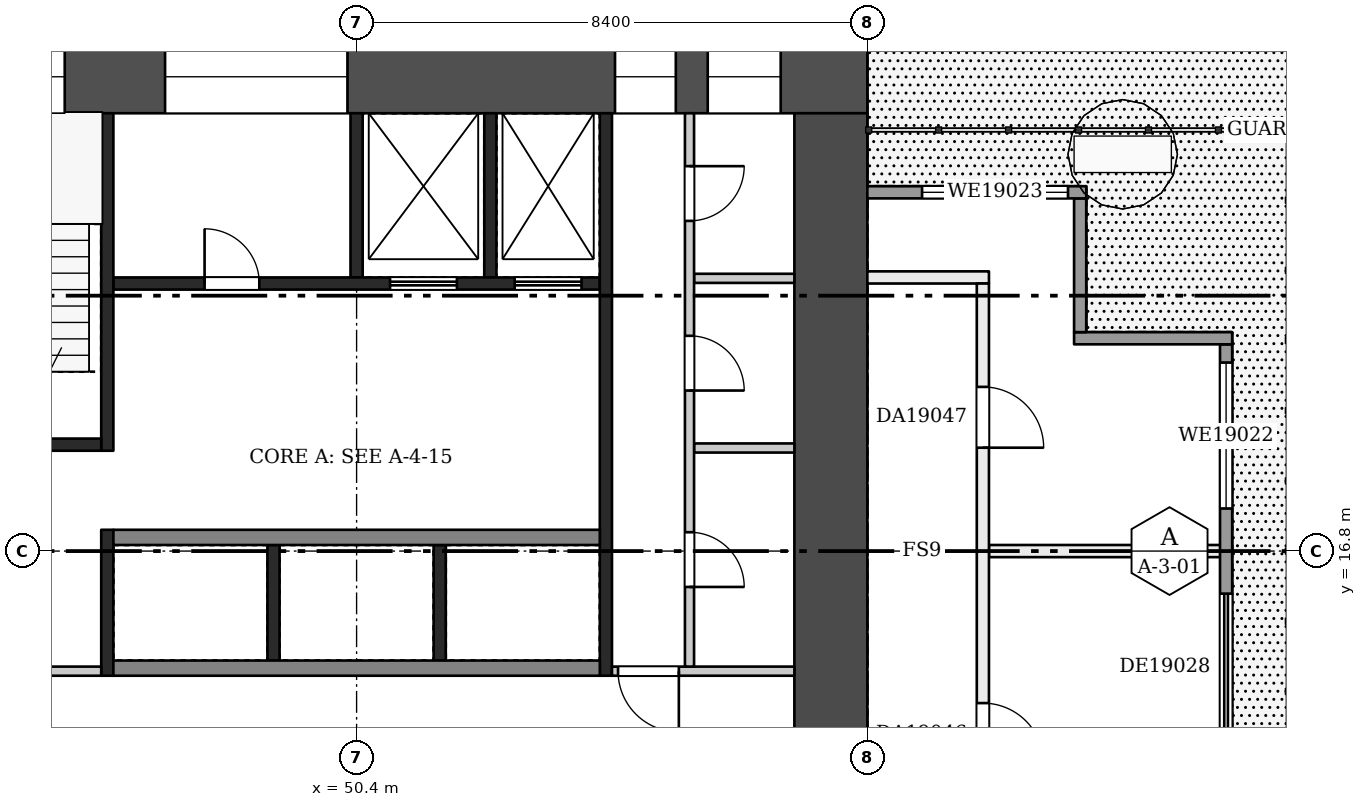
"""IFC4 building model, lengths in metres.
Left out: names, types, materials, properties, quantities, classifications, styles, units other than length and angle.
Written with IfcOpenShell. Run it as: python <this file> out.ifc"""

import sys

from ifc_helpers import new_model, si_unit, direction, frame, frame_2d, origin, place, context, subcontext, project, spatial, rectangle, extrude, element, fill, save


model = new_model("IFC4")
c1 = context("Model", 3, precision=1e-05, world=origin(), true_north=direction((0.0, 1.0)))
c2 = subcontext(c1, "Body", "Model", "MODEL_VIEW")
j1 = project(units=[si_unit("LENGTHUNIT", "METRE"), si_unit("PLANEANGLEUNIT", "RADIAN")], contexts=[c1])
p1 = place(None, origin())
s1 = spatial("IfcSite", under=j1, at=p1, CompositionType="ELEMENT")
p2 = place(p1, origin())
s2 = spatial("IfcBuilding", under=s1, at=p2, CompositionType="ELEMENT")
p3 = place(p2, frame((0.0, 0.0, 81.2)))
s3 = spatial("IfcBuildingStorey", under=s2, at=p3, CompositionType="ELEMENT", Elevation=81.2)
p4 = place(p3, frame((42.0, 24.6, 0.0), z_axis=(0.0, 0.0, 1.0), x_axis=(1.0, 0.0, 0.0)))
e1 = element("IfcWall", 1, at=p4, inside=s3, PredefinedType="SHEAR", context=c2, shape_type="SweptSolid", body=[
    extrude(rectangle(XDim=16.8, YDim=1.2, at=frame_2d((8.4, 0.0))), origin(), (0.0, 0.0, 1.0), 3.22),
])
p5 = place(p4, frame((1.8, 0.0, 0.5)))
e2 = element("IfcOpeningElement", 2, at=p5, cuts=e1, PredefinedType="OPENING", context=c2, shape_type="SweptSolid", body=[
    extrude(rectangle(XDim=1.8, YDim=2.4, at=frame_2d((0.9, 1.2))), frame((0.0, 0.61, 0.0), z_axis=(0.0, -1.0, 0.0), x_axis=(1.0, 0.0, 0.0)), (0.0, 0.0, 1.0), 1.22),
])
p6 = place(p4, frame((5.25, 0.0, 1.6)))
e3 = element("IfcOpeningElement", 3, at=p6, cuts=e1, PredefinedType="OPENING", context=c2, shape_type="SweptSolid", body=[
    extrude(rectangle(XDim=3.0, YDim=1.2, at=frame_2d((1.5, 0.6))), frame((0.0, 0.61, 0.0), z_axis=(0.0, -1.0, 0.0), x_axis=(1.0, 0.0, 0.0)), (0.0, 0.0, 1.0), 1.22),
])
p7 = place(p4, frame((12.65, 0.0, 0.6)))
e4 = element("IfcOpeningElement", 4, at=p7, cuts=e1, PredefinedType="OPENING", context=c2, shape_type="SweptSolid", body=[
    extrude(rectangle(XDim=1.0, YDim=2.1, at=frame_2d((0.5, 1.05))), frame((0.0, 0.61, 0.0), z_axis=(0.0, -1.0, 0.0), x_axis=(1.0, 0.0, 0.0)), (0.0, 0.0, 1.0), 1.22),
])
p8 = place(p4, frame((14.175, 0.0, 1.6)))
e5 = element("IfcOpeningElement", 5, at=p8, cuts=e1, PredefinedType="OPENING", context=c2, shape_type="SweptSolid", body=[
    extrude(rectangle(XDim=1.2, YDim=1.2, at=frame_2d((0.6, 0.6))), frame((0.0, 0.61, 0.0), z_axis=(0.0, -1.0, 0.0), x_axis=(1.0, 0.0, 0.0)), (0.0, 0.0, 1.0), 1.22),
])
p9 = place(p3, frame((58.2, 9.6, 0.0), z_axis=(0.0, 0.0, 1.0), x_axis=(0.0, 1.0, 0.0)))
e6 = element("IfcWall", 6, at=p9, inside=s3, PredefinedType="SHEAR", context=c2, shape_type="SweptSolid", body=[
    extrude(rectangle(XDim=14.4, YDim=1.2, at=frame_2d((7.2, 0.0))), origin(), (0.0, 0.0, 1.0), 3.22),
])
p10 = place(p9, frame((2.1, 0.0, 0.0)))
e7 = element("IfcOpeningElement", 7, at=p10, cuts=e6, PredefinedType="OPENING", context=c2, shape_type="SweptSolid", body=[
    extrude(rectangle(XDim=1.8, YDim=2.1, at=frame_2d((0.9, 1.05))), frame((0.0, 0.61, 0.0), z_axis=(0.0, -1.0, 0.0), x_axis=(1.0, 0.0, 0.0)), (0.0, 0.0, 1.0), 1.22),
])
for number, where, z_axis, x_axis in (
    (8, (49.033, 15.0, 0.0), (0.0, 0.0, 1.0), (0.0, 1.0, 0.0)),
    (9, (51.767, 15.0, 0.0), (0.0, 0.0, 1.0), (0.0, 1.0, 0.0)),
):
    element("IfcWall", number, at=place(p3, frame(where, z_axis=z_axis, x_axis=x_axis)), inside=s3, PredefinedType="SHEAR", context=c2, shape_type="SweptSolid", body=[
        extrude(rectangle(XDim=1.9, YDim=0.2, at=frame_2d((0.95, 0.0))), origin(), (0.0, 0.0, 1.0), 3.22),
    ])
for number, where, z_axis, x_axis in (
    (10, (46.4, 14.875, 0.0), (0.0, 0.0, 1.0), (1.0, 0.0, 0.0)),
    (11, (46.4, 17.025, 0.0), (0.0, 0.0, 1.0), (1.0, 0.0, 0.0)),
):
    element("IfcWall", number, at=place(p3, frame(where, z_axis=z_axis, x_axis=x_axis)), inside=s3, PredefinedType="SHEAR", context=c2, shape_type="SweptSolid", body=[
        extrude(rectangle(XDim=8.0, YDim=0.25, at=frame_2d((4.0, 0.0))), origin(), (0.0, 0.0, 1.0), 3.22),
    ])
for number, where, z_axis, x_axis in (
    (12, (50.4, 21.3, 0.0), (0.0, 0.0, 1.0), (0.0, 1.0, 0.0)),
    (13, (52.6, 21.3, 0.0), (0.0, 0.0, 1.0), (0.0, 1.0, 0.0)),
):
    element("IfcWall", number, at=place(p3, frame(where, z_axis=z_axis, x_axis=x_axis)), inside=s3, PredefinedType="SHEAR", context=c2, shape_type="SweptSolid", body=[
        extrude(rectangle(XDim=2.7, YDim=0.2, at=frame_2d((1.35, 0.0))), origin(), (0.0, 0.0, 1.0), 3.22),
    ])
p11 = place(p3, frame((46.4, 21.2, 0.0), z_axis=(0.0, 0.0, 1.0), x_axis=(1.0, 0.0, 0.0)))
e14 = element("IfcWall", 14, at=p11, inside=s3, PredefinedType="SHEAR", context=c2, shape_type="SweptSolid", body=[
    extrude(rectangle(XDim=8.0, YDim=0.2, at=frame_2d((4.0, 0.0))), origin(), (0.0, 0.0, 1.0), 3.22),
])
p12 = place(p11, frame((1.5, 0.0, 0.0)))
e15 = element("IfcOpeningElement", 15, at=p12, cuts=e14, PredefinedType="OPENING", context=c2, shape_type="SweptSolid", body=[
    extrude(rectangle(XDim=0.9, YDim=2.1, at=frame_2d((0.45, 1.05))), frame((0.0, 0.11, 0.0), z_axis=(0.0, -1.0, 0.0), x_axis=(1.0, 0.0, 0.0)), (0.0, 0.0, 1.0), 0.22),
])
p13 = place(p11, frame((4.55, 0.0, 0.0)))
e16 = element("IfcOpeningElement", 16, at=p13, cuts=e14, PredefinedType="OPENING", context=c2, shape_type="SweptSolid", body=[
    extrude(rectangle(XDim=1.1, YDim=2.1, at=frame_2d((0.55, 1.05))), frame((0.0, 0.11, 0.0), z_axis=(0.0, -1.0, 0.0), x_axis=(1.0, 0.0, 0.0)), (0.0, 0.0, 1.0), 0.22),
])
p14 = place(p11, frame((6.6, 0.0, 0.0)))
e17 = element("IfcOpeningElement", 17, at=p14, cuts=e14, PredefinedType="OPENING", context=c2, shape_type="SweptSolid", body=[
    extrude(rectangle(XDim=1.1, YDim=2.1, at=frame_2d((0.55, 1.05))), frame((0.0, 0.11, 0.0), z_axis=(0.0, -1.0, 0.0), x_axis=(1.0, 0.0, 0.0)), (0.0, 0.0, 1.0), 0.22),
])
p15 = place(p3, frame((46.3, 14.75, 0.0), z_axis=(0.0, 0.0, 1.0), x_axis=(0.0, 1.0, 0.0)))
e18 = element("IfcWall", 18, at=p15, inside=s3, PredefinedType="SHEAR", context=c2, shape_type="SweptSolid", body=[
    extrude(rectangle(XDim=2.4, YDim=0.2, at=frame_2d((1.2, 0.0))), origin(), (0.0, 0.0, 1.0), 3.22),
])
p16 = place(p3, frame((46.3, 18.45, 0.0), z_axis=(0.0, 0.0, 1.0), x_axis=(0.0, 1.0, 0.0)))
e19 = element("IfcWall", 19, at=p16, inside=s3, PredefinedType="SHEAR", context=c2, shape_type="SweptSolid", body=[
    extrude(rectangle(XDim=5.55, YDim=0.2, at=frame_2d((2.775, 0.0))), origin(), (0.0, 0.0, 1.0), 3.22),
])
p17 = place(p3, frame((43.2, 14.825, 0.0), z_axis=(0.0, 0.0, 1.0), x_axis=(1.0, 0.0, 0.0)))
e20 = element("IfcWall", 20, at=p17, inside=s3, PredefinedType="PARTITIONING", context=c2, shape_type="SweptSolid", body=[
    extrude(rectangle(XDim=3.0, YDim=0.15, at=frame_2d((1.5, 0.0))), origin(), (0.0, 0.0, 1.0), 3.22),
])
p18 = place(p17, frame((1.0, 0.0, 0.0)))
e21 = element("IfcOpeningElement", 21, at=p18, cuts=e20, PredefinedType="OPENING", context=c2, shape_type="SweptSolid", body=[
    extrude(rectangle(XDim=1.0, YDim=2.1, at=frame_2d((0.5, 1.05))), frame((0.0, 0.085, 0.0), z_axis=(0.0, -1.0, 0.0), x_axis=(1.0, 0.0, 0.0)), (0.0, 0.0, 1.0), 0.17),
])
p19 = place(p3, frame((43.2, 18.55, 0.0), z_axis=(0.0, 0.0, 1.0), x_axis=(1.0, 0.0, 0.0)))
e22 = element("IfcWall", 22, at=p19, inside=s3, PredefinedType="SHEAR", context=c2, shape_type="SweptSolid", body=[
    extrude(rectangle(XDim=3.0, YDim=0.2, at=frame_2d((1.5, 0.0))), origin(), (0.0, 0.0, 1.0), 3.22),
])
p20 = place(p19, frame((1.0, 0.0, 0.0)))
e23 = element("IfcOpeningElement", 23, at=p20, cuts=e22, PredefinedType="OPENING", context=c2, shape_type="SweptSolid", body=[
    extrude(rectangle(XDim=1.0, YDim=2.1, at=frame_2d((0.5, 1.05))), frame((0.0, 0.11, 0.0), z_axis=(0.0, -1.0, 0.0), x_axis=(1.0, 0.0, 0.0)), (0.0, 0.0, 1.0), 0.22),
])
p21 = place(p3, frame((54.5, 14.75, 0.0), z_axis=(0.0, 0.0, 1.0), x_axis=(0.0, 1.0, 0.0)))
e24 = element("IfcWall", 24, at=p21, inside=s3, PredefinedType="SHEAR", context=c2, shape_type="SweptSolid", body=[
    extrude(rectangle(XDim=9.25, YDim=0.2, at=frame_2d((4.625, 0.0))), origin(), (0.0, 0.0, 1.0), 3.22),
])
p22 = place(p3, frame((54.6, 14.825, 0.0), z_axis=(0.0, 0.0, 1.0), x_axis=(1.0, 0.0, 0.0)))
e25 = element("IfcWall", 25, at=p22, inside=s3, PredefinedType="PARTITIONING", context=c2, shape_type="SweptSolid", body=[
    extrude(rectangle(XDim=3.0, YDim=0.15, at=frame_2d((1.5, 0.0))), origin(), (0.0, 0.0, 1.0), 3.22),
])
p23 = place(p22, frame((0.1, 0.0, 0.0)))
e26 = element("IfcOpeningElement", 26, at=p23, cuts=e25, PredefinedType="OPENING", context=c2, shape_type="SweptSolid", body=[
    extrude(rectangle(XDim=1.0, YDim=2.1, at=frame_2d((0.5, 1.05))), frame((0.0, 0.085, 0.0), z_axis=(0.0, -1.0, 0.0), x_axis=(1.0, 0.0, 0.0)), (0.0, 0.0, 1.0), 0.17),
])
for number, where, z_axis, x_axis in (
    (27, (55.95, 18.495, 0.0), (0.0, 0.0, 1.0), (1.0, 0.0, 0.0)),
    (28, (55.95, 21.285, 0.0), (0.0, 0.0, 1.0), (1.0, 0.0, 0.0)),
):
    element("IfcWall", number, at=place(p3, frame(where, z_axis=z_axis, x_axis=x_axis)), inside=s3, PredefinedType="PARTITIONING", context=c2, shape_type="SweptSolid", body=[
        extrude(rectangle(XDim=1.65, YDim=0.15, at=frame_2d((0.825, 0.0))), origin(), (0.0, 0.0, 1.0), 3.22),
    ])
p24 = place(p3, frame((55.875, 14.9, 0.0), z_axis=(0.0, 0.0, 1.0), x_axis=(0.0, 1.0, 0.0)))
e29 = element("IfcWall", 29, at=p24, inside=s3, PredefinedType="PARTITIONING", context=c2, shape_type="SweptSolid", body=[
    extrude(rectangle(XDim=9.1, YDim=0.15, at=frame_2d((4.55, 0.0))), origin(), (0.0, 0.0, 1.0), 3.22),
])
p25 = place(p24, frame((1.31, 0.0, 0.0)))
e30 = element("IfcOpeningElement", 30, at=p25, cuts=e29, PredefinedType="OPENING", context=c2, shape_type="SweptSolid", body=[
    extrude(rectangle(XDim=0.9, YDim=2.1, at=frame_2d((0.45, 1.05))), frame((0.0, 0.085, 0.0), z_axis=(0.0, -1.0, 0.0), x_axis=(1.0, 0.0, 0.0)), (0.0, 0.0, 1.0), 0.17),
])
p26 = place(p24, frame((4.54, 0.0, 0.0)))
e31 = element("IfcOpeningElement", 31, at=p26, cuts=e29, PredefinedType="OPENING", context=c2, shape_type="SweptSolid", body=[
    extrude(rectangle(XDim=0.9, YDim=2.1, at=frame_2d((0.45, 1.05))), frame((0.0, 0.085, 0.0), z_axis=(0.0, -1.0, 0.0), x_axis=(1.0, 0.0, 0.0)), (0.0, 0.0, 1.0), 0.17),
])
p27 = place(p24, frame((7.33, 0.0, 0.0)))
e32 = element("IfcOpeningElement", 32, at=p27, cuts=e29, PredefinedType="OPENING", context=c2, shape_type="SweptSolid", body=[
    extrude(rectangle(XDim=0.9, YDim=2.1, at=frame_2d((0.45, 1.05))), frame((0.0, 0.085, 0.0), z_axis=(0.0, -1.0, 0.0), x_axis=(1.0, 0.0, 0.0)), (0.0, 0.0, 1.0), 0.17),
])
p28 = place(p3, frame((60.8, 16.8, 0.0), z_axis=(0.0, 0.0, 1.0), x_axis=(1.0, 0.0, 0.0)))
e33 = element("IfcWall", 33, at=p28, inside=s3, PredefinedType="PARTITIONING", context=c2, shape_type="SweptSolid", body=[
    extrude(rectangle(XDim=3.9, YDim=0.2, at=frame_2d((1.95, 0.0))), origin(), (0.0, 0.0, 1.0), 3.22),
])
p29 = place(p3, frame((58.8, 21.3, 0.0), z_axis=(0.0, 0.0, 1.0), x_axis=(1.0, 0.0, 0.0)))
e34 = element("IfcWall", 34, at=p29, inside=s3, PredefinedType="PARTITIONING", context=c2, shape_type="SweptSolid", body=[
    extrude(rectangle(XDim=2.0, YDim=0.2, at=frame_2d((1.0, 0.0))), origin(), (0.0, 0.0, 1.0), 3.22),
])
p30 = place(p3, frame((60.7, 10.9, 0.0), z_axis=(0.0, 0.0, 1.0), x_axis=(0.0, 1.0, 0.0)))
e35 = element("IfcWall", 35, at=p30, inside=s3, PredefinedType="PARTITIONING", context=c2, shape_type="SweptSolid", body=[
    extrude(rectangle(XDim=10.3, YDim=0.2, at=frame_2d((5.15, 0.0))), origin(), (0.0, 0.0, 1.0), 3.22),
])
p31 = place(p30, frame((2.4, 0.0, 0.0)))
e36 = element("IfcOpeningElement", 36, at=p31, cuts=e35, PredefinedType="OPENING", context=c2, shape_type="SweptSolid", body=[
    extrude(rectangle(XDim=1.0, YDim=2.1, at=frame_2d((0.5, 1.05))), frame((0.0, 0.11, 0.0), z_axis=(0.0, -1.0, 0.0), x_axis=(1.0, 0.0, 0.0)), (0.0, 0.0, 1.0), 0.22),
])
p32 = place(p30, frame((7.6, 0.0, 0.0)))
e37 = element("IfcOpeningElement", 37, at=p32, cuts=e35, PredefinedType="OPENING", context=c2, shape_type="SweptSolid", body=[
    extrude(rectangle(XDim=1.0, YDim=2.1, at=frame_2d((0.5, 1.05))), frame((0.0, 0.11, 0.0), z_axis=(0.0, -1.0, 0.0), x_axis=(1.0, 0.0, 0.0)), (0.0, 0.0, 1.0), 0.22),
])
p33 = place(p3, frame((64.7, 13.4, 0.0), z_axis=(0.0, 0.0, 1.0), x_axis=(0.0, 1.0, 0.0)))
e38 = element("IfcWall", 38, at=p33, inside=s3, PredefinedType="SOLIDWALL", context=c2, shape_type="SweptSolid", body=[
    extrude(rectangle(XDim=6.8, YDim=0.2, at=frame_2d((3.4, 0.0))), origin(), (0.0, 0.0, 1.0), 3.22),
])
p34 = place(p33, frame((4.1, 0.0, 0.9)))
e39 = element("IfcOpeningElement", 39, at=p34, cuts=e38, PredefinedType="OPENING", context=c2, shape_type="SweptSolid", body=[
    extrude(rectangle(XDim=2.4, YDim=1.5, at=frame_2d((1.2, 0.75))), frame((0.0, 0.11, 0.0), z_axis=(0.0, -1.0, 0.0), x_axis=(1.0, 0.0, 0.0)), (0.0, 0.0, 1.0), 0.22),
])
p35 = place(p33, frame((0.3, 0.0, 0.0)))
e40 = element("IfcOpeningElement", 40, at=p35, cuts=e38, PredefinedType="OPENING", context=c2, shape_type="SweptSolid", body=[
    extrude(rectangle(XDim=2.4, YDim=2.2, at=frame_2d((1.2, 1.1))), frame((0.0, 0.11, 0.0), z_axis=(0.0, -1.0, 0.0), x_axis=(1.0, 0.0, 0.0)), (0.0, 0.0, 1.0), 0.22),
])
p36 = place(p3, frame((64.8, 20.3, 0.0), z_axis=(0.0, 0.0, 1.0), x_axis=(-1.0, 0.0, 0.0)))
e41 = element("IfcWall", 41, at=p36, inside=s3, PredefinedType="SOLIDWALL", context=c2, shape_type="SweptSolid", body=[
    extrude(rectangle(XDim=2.6, YDim=0.2, at=frame_2d((1.3, 0.0))), origin(), (0.0, 0.0, 1.0), 3.22),
])
p37 = place(p3, frame((62.3, 20.4, 0.0), z_axis=(0.0, 0.0, 1.0), x_axis=(0.0, 1.0, 0.0)))
e42 = element("IfcWall", 42, at=p37, inside=s3, PredefinedType="SOLIDWALL", context=c2, shape_type="SweptSolid", body=[
    extrude(rectangle(XDim=2.2, YDim=0.2, at=frame_2d((1.1, 0.0))), origin(), (0.0, 0.0, 1.0), 3.22),
])
p38 = place(p3, frame((62.4, 22.7, 0.0), z_axis=(0.0, 0.0, 1.0), x_axis=(-1.0, 0.0, 0.0)))
e43 = element("IfcWall", 43, at=p38, inside=s3, PredefinedType="SOLIDWALL", context=c2, shape_type="SweptSolid", body=[
    extrude(rectangle(XDim=3.6, YDim=0.2, at=frame_2d((1.8, 0.0))), origin(), (0.0, 0.0, 1.0), 3.22),
])
p39 = place(p38, frame((0.3, 0.0, 0.9)))
e44 = element("IfcOpeningElement", 44, at=p39, cuts=e43, PredefinedType="OPENING", context=c2, shape_type="SweptSolid", body=[
    extrude(rectangle(XDim=2.4, YDim=1.5, at=frame_2d((1.2, 0.75))), frame((0.0, 0.11, 0.0), z_axis=(0.0, -1.0, 0.0), x_axis=(1.0, 0.0, 0.0)), (0.0, 0.0, 1.0), 0.22),
])
p40 = place(p12, origin())
e45 = element("IfcDoor", 45, at=p40, inside=s3, OperationType="SINGLE_SWING_LEFT", PredefinedType="DOOR", context=c2, shape_type="SweptSolid", body=[
    extrude(rectangle(XDim=0.9, YDim=2.1, at=frame_2d((0.45, 1.05))), frame((0.0, 0.025, 0.0), z_axis=(0.0, -1.0, 0.0), x_axis=(1.0, 0.0, 0.0)), (0.0, 0.0, 1.0), 0.05),
])
fill(e15, e45)
p41 = place(p13, origin())
e46 = element("IfcDoor", 46, at=p41, inside=s3, OperationType="DOUBLE_DOOR_SLIDING", PredefinedType="DOOR", context=c2, shape_type="SweptSolid", body=[
    extrude(rectangle(XDim=1.1, YDim=2.1, at=frame_2d((0.55, 1.05))), frame((0.0, 0.025, 0.0), z_axis=(0.0, -1.0, 0.0), x_axis=(1.0, 0.0, 0.0)), (0.0, 0.0, 1.0), 0.05),
])
fill(e16, e46)
p42 = place(p14, origin())
e47 = element("IfcDoor", 47, at=p42, inside=s3, OperationType="DOUBLE_DOOR_SLIDING", PredefinedType="DOOR", context=c2, shape_type="SweptSolid", body=[
    extrude(rectangle(XDim=1.1, YDim=2.1, at=frame_2d((0.55, 1.05))), frame((0.0, 0.025, 0.0), z_axis=(0.0, -1.0, 0.0), x_axis=(1.0, 0.0, 0.0)), (0.0, 0.0, 1.0), 0.05),
])
fill(e17, e47)
p43 = place(p23, frame((1.0, 0.0, 0.0), z_axis=(0.0, 0.0, 1.0), x_axis=(-1.0, 0.0, 0.0)))
e48 = element("IfcDoor", 48, at=p43, inside=s3, OperationType="SINGLE_SWING_LEFT", PredefinedType="DOOR", context=c2, shape_type="SweptSolid", body=[
    extrude(rectangle(XDim=1.0, YDim=2.1, at=frame_2d((0.5, 1.05))), frame((0.0, 0.025, 0.0), z_axis=(0.0, -1.0, 0.0), x_axis=(1.0, 0.0, 0.0)), (0.0, 0.0, 1.0), 0.05),
])
fill(e26, e48)
p44 = place(p25, frame((0.9, 0.0, 0.0), z_axis=(0.0, 0.0, 1.0), x_axis=(-1.0, 0.0, 0.0)))
e49 = element("IfcDoor", 49, at=p44, inside=s3, OperationType="SINGLE_SWING_RIGHT", PredefinedType="DOOR", context=c2, shape_type="SweptSolid", body=[
    extrude(rectangle(XDim=0.9, YDim=2.1, at=frame_2d((0.45, 1.05))), frame((0.0, 0.025, 0.0), z_axis=(0.0, -1.0, 0.0), x_axis=(1.0, 0.0, 0.0)), (0.0, 0.0, 1.0), 0.05),
])
fill(e30, e49)
p45 = place(p26, frame((0.9, 0.0, 0.0), z_axis=(0.0, 0.0, 1.0), x_axis=(-1.0, 0.0, 0.0)))
e50 = element("IfcDoor", 50, at=p45, inside=s3, OperationType="SINGLE_SWING_RIGHT", PredefinedType="DOOR", context=c2, shape_type="SweptSolid", body=[
    extrude(rectangle(XDim=0.9, YDim=2.1, at=frame_2d((0.45, 1.05))), frame((0.0, 0.025, 0.0), z_axis=(0.0, -1.0, 0.0), x_axis=(1.0, 0.0, 0.0)), (0.0, 0.0, 1.0), 0.05),
])
fill(e31, e50)
p46 = place(p27, frame((0.9, 0.0, 0.0), z_axis=(0.0, 0.0, 1.0), x_axis=(-1.0, 0.0, 0.0)))
e51 = element("IfcDoor", 51, at=p46, inside=s3, OperationType="SINGLE_SWING_LEFT", PredefinedType="DOOR", context=c2, shape_type="SweptSolid", body=[
    extrude(rectangle(XDim=0.9, YDim=2.1, at=frame_2d((0.45, 1.05))), frame((0.0, 0.025, 0.0), z_axis=(0.0, -1.0, 0.0), x_axis=(1.0, 0.0, 0.0)), (0.0, 0.0, 1.0), 0.05),
])
fill(e32, e51)
p47 = place(p5, origin())
e52 = element("IfcWindow", 52, at=p47, inside=s3, PartitioningType="SINGLE_PANEL", PredefinedType="WINDOW", context=c2, shape_type="SweptSolid", body=[
    extrude(rectangle(XDim=1.8, YDim=2.4, at=frame_2d((0.9, 1.2))), frame((0.0, 0.03, 0.0), z_axis=(0.0, -1.0, 0.0), x_axis=(1.0, 0.0, 0.0)), (0.0, 0.0, 1.0), 0.06),
])
fill(e2, e52)
p48 = place(p6, origin())
e53 = element("IfcWindow", 53, at=p48, inside=s3, PartitioningType="SINGLE_PANEL", PredefinedType="WINDOW", context=c2, shape_type="SweptSolid", body=[
    extrude(rectangle(XDim=3.0, YDim=1.2, at=frame_2d((1.5, 0.6))), frame((0.0, 0.03, 0.0), z_axis=(0.0, -1.0, 0.0), x_axis=(1.0, 0.0, 0.0)), (0.0, 0.0, 1.0), 0.06),
])
fill(e3, e53)
p49 = place(p7, origin())
e54 = element("IfcWindow", 54, at=p49, inside=s3, PartitioningType="SINGLE_PANEL", PredefinedType="WINDOW", context=c2, shape_type="SweptSolid", body=[
    extrude(rectangle(XDim=1.0, YDim=2.1, at=frame_2d((0.5, 1.05))), frame((0.0, 0.03, 0.0), z_axis=(0.0, -1.0, 0.0), x_axis=(1.0, 0.0, 0.0)), (0.0, 0.0, 1.0), 0.06),
])
fill(e4, e54)
p50 = place(p8, origin())
e55 = element("IfcWindow", 55, at=p50, inside=s3, PartitioningType="SINGLE_PANEL", PredefinedType="WINDOW", context=c2, shape_type="SweptSolid", body=[
    extrude(rectangle(XDim=1.2, YDim=1.2, at=frame_2d((0.6, 0.6))), frame((0.0, 0.03, 0.0), z_axis=(0.0, -1.0, 0.0), x_axis=(1.0, 0.0, 0.0)), (0.0, 0.0, 1.0), 0.06),
])
fill(e5, e55)
p51 = place(p31, frame((1.0, 0.0, 0.0), z_axis=(0.0, 0.0, 1.0), x_axis=(-1.0, 0.0, 0.0)))
e56 = element("IfcDoor", 56, at=p51, inside=s3, OperationType="SINGLE_SWING_RIGHT", PredefinedType="DOOR", context=c2, shape_type="SweptSolid", body=[
    extrude(rectangle(XDim=1.0, YDim=2.1, at=frame_2d((0.5, 1.05))), frame((0.0, 0.025, 0.0), z_axis=(0.0, -1.0, 0.0), x_axis=(1.0, 0.0, 0.0)), (0.0, 0.0, 1.0), 0.05),
])
fill(e36, e56)
p52 = place(p32, frame((1.0, 0.0, 0.0), z_axis=(0.0, 0.0, 1.0), x_axis=(-1.0, 0.0, 0.0)))
e57 = element("IfcDoor", 57, at=p52, inside=s3, OperationType="SINGLE_SWING_RIGHT", PredefinedType="DOOR", context=c2, shape_type="SweptSolid", body=[
    extrude(rectangle(XDim=1.0, YDim=2.1, at=frame_2d((0.5, 1.05))), frame((0.0, 0.025, 0.0), z_axis=(0.0, -1.0, 0.0), x_axis=(1.0, 0.0, 0.0)), (0.0, 0.0, 1.0), 0.05),
])
fill(e37, e57)
p53 = place(p34, origin())
e58 = element("IfcWindow", 58, at=p53, inside=s3, PartitioningType="SINGLE_PANEL", PredefinedType="WINDOW", context=c2, shape_type="SweptSolid", body=[
    extrude(rectangle(XDim=2.4, YDim=1.5, at=frame_2d((1.2, 0.75))), frame((0.0, 0.03, 0.0), z_axis=(0.0, -1.0, 0.0), x_axis=(1.0, 0.0, 0.0)), (0.0, 0.0, 1.0), 0.06),
])
fill(e39, e58)
p54 = place(p39, origin())
e59 = element("IfcWindow", 59, at=p54, inside=s3, PartitioningType="SINGLE_PANEL", PredefinedType="WINDOW", context=c2, shape_type="SweptSolid", body=[
    extrude(rectangle(XDim=2.4, YDim=1.5, at=frame_2d((1.2, 0.75))), frame((0.0, 0.03, 0.0), z_axis=(0.0, -1.0, 0.0), x_axis=(1.0, 0.0, 0.0)), (0.0, 0.0, 1.0), 0.06),
])
fill(e44, e59)
p55 = place(p35, origin())
e60 = element("IfcDoor", 60, at=p55, inside=s3, OperationType="DOUBLE_DOOR_SLIDING", PredefinedType="DOOR", context=c2, shape_type="SweptSolid", body=[
    extrude(rectangle(XDim=2.4, YDim=2.2, at=frame_2d((1.2, 1.1))), frame((0.0, 0.025, 0.0), z_axis=(0.0, -1.0, 0.0), x_axis=(1.0, 0.0, 0.0)), (0.0, 0.0, 1.0), 0.05),
])
fill(e40, e60)
save(model, sys.argv[1])
